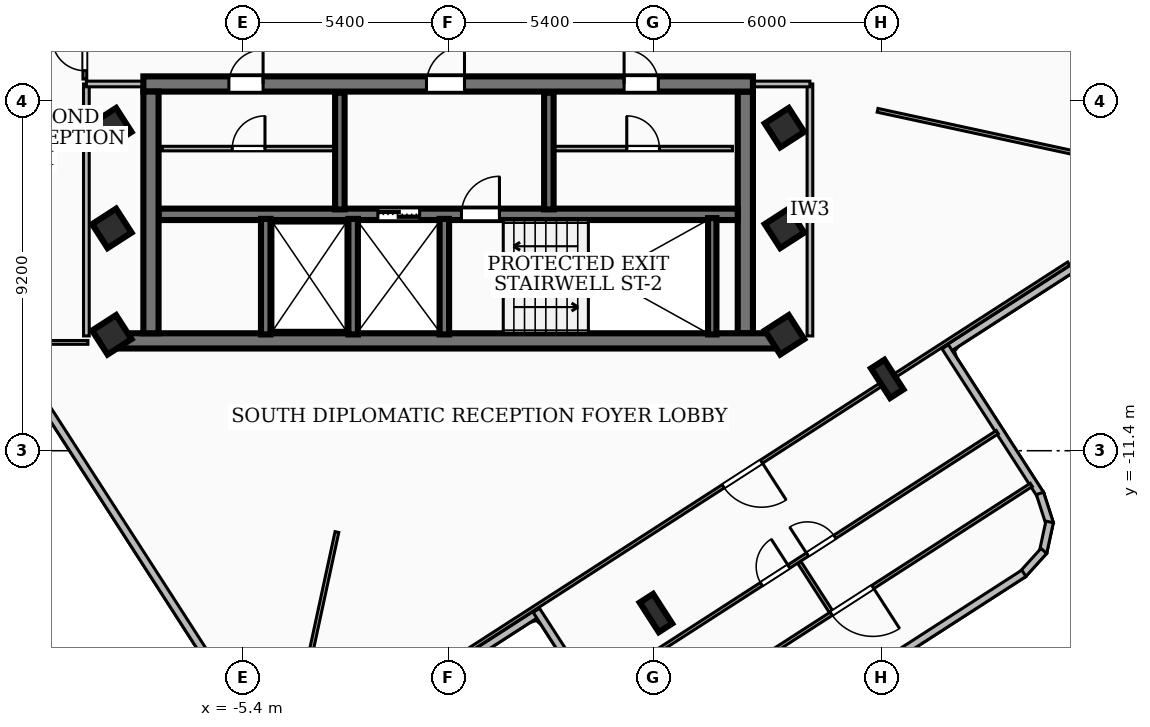
"""IFC4 building model, lengths in metres.
Left out: names, types, materials, properties, quantities, classifications, styles, units other than length and angle.
Written with IfcOpenShell. Run it as: python <this file> out.ifc"""

import sys

from ifc_helpers import new_model, si_unit, direction, frame, frame_2d, origin, origin_2d, place, context, subcontext, project, spatial, rectangle, i_section, extrude, element, fill, save


model = new_model("IFC4")
c1 = context("Model", 3, precision=1e-05, world=origin(), true_north=direction((0.0, 1.0)))
c2 = subcontext(c1, "Body", "Model", "MODEL_VIEW")
j1 = project(units=[si_unit("LENGTHUNIT", "METRE"), si_unit("PLANEANGLEUNIT", "RADIAN")], contexts=[c1])
p1 = place(None, origin())
s1 = spatial("IfcSite", under=j1, at=p1, CompositionType="ELEMENT")
p2 = place(p1, origin())
s2 = spatial("IfcBuilding", under=s1, at=p2, CompositionType="ELEMENT")
p3 = place(p2, frame((0.0, 0.0, 218.88)))
s3 = spatial("IfcBuildingStorey", under=s2, at=p3, CompositionType="ELEMENT", Elevation=218.88)
p4 = place(p3, frame((8.78, -8.51, 0.0), z_axis=(0.0, 0.0, 1.0), x_axis=(-1.0, 0.0, 0.0)))
e1 = element("IfcWall", 1, at=p4, inside=s3, PredefinedType="SHEAR", context=c2, shape_type="SweptSolid", body=[
    extrude(rectangle(XDim=17.56, YDim=0.4, at=frame_2d((8.78, 0.0))), origin(), (0.0, 0.0, 1.0), 3.14),
])
p5 = place(p3, frame((-8.02, -1.75, 0.0), z_axis=(0.0, 0.0, 1.0), x_axis=(1.0, 0.0, 0.0)))
e2 = element("IfcWall", 2, at=p5, inside=s3, PredefinedType="SHEAR", context=c2, shape_type="SweptSolid", body=[
    extrude(rectangle(XDim=16.04, YDim=0.4, at=frame_2d((8.02, 0.0))), origin(), (0.0, 0.0, 1.0), 3.14),
])
p6 = place(p5, frame((7.45, 0.0, 0.0)))
e3 = element("IfcOpeningElement", 3, at=p6, cuts=e2, PredefinedType="OPENING", context=c2, shape_type="SweptSolid", body=[
    extrude(rectangle(XDim=1.0, YDim=2.1, at=frame_2d((0.5, 1.05))), frame((0.0, 0.21, 0.0), z_axis=(0.0, -1.0, 0.0), x_axis=(1.0, 0.0, 0.0)), (0.0, 0.0, 1.0), 0.42),
])
p7 = place(p5, frame((12.65, 0.0, 0.0)))
e4 = element("IfcOpeningElement", 4, at=p7, cuts=e2, PredefinedType="OPENING", context=c2, shape_type="SweptSolid", body=[
    extrude(rectangle(XDim=0.9, YDim=2.06, at=frame_2d((0.45, 1.03))), frame((0.0, 0.21, 0.0), z_axis=(0.0, -1.0, 0.0), x_axis=(1.0, 0.0, 0.0)), (0.0, 0.0, 1.0), 0.42),
])
p8 = place(p5, frame((2.25, 0.0, 0.0)))
e5 = element("IfcOpeningElement", 5, at=p8, cuts=e2, PredefinedType="OPENING", context=c2, shape_type="SweptSolid", body=[
    extrude(rectangle(XDim=0.9, YDim=2.06, at=frame_2d((0.45, 1.03))), frame((0.0, 0.21, 0.0), z_axis=(0.0, -1.0, 0.0), x_axis=(1.0, 0.0, 0.0)), (0.0, 0.0, 1.0), 0.42),
])
for number, where, z_axis, x_axis in (
    (6, (-7.82, -8.31, 0.0), (0.0, 0.0, 1.0), (0.0, 1.0, 0.0)),
    (7, (7.82, -1.95, 0.0), (0.0, 0.0, 1.0), (0.0, -1.0, 0.0)),
):
    element("IfcWall", number, at=place(p3, frame(where, z_axis=z_axis, x_axis=x_axis)), inside=s3, PredefinedType="SHEAR", context=c2, shape_type="SweptSolid", body=[
        extrude(rectangle(XDim=6.36, YDim=0.4, at=frame_2d((3.18, 0.0))), origin(), (0.0, 0.0, 1.0), 3.14),
    ])
p9 = place(p3, frame((-7.62, -5.18, 0.0), z_axis=(0.0, 0.0, 1.0), x_axis=(1.0, 0.0, 0.0)))
e8 = element("IfcWall", 8, at=p9, inside=s3, PredefinedType="SOLIDWALL", context=c2, shape_type="SweptSolid", body=[
    extrude(rectangle(XDim=15.24, YDim=0.3, at=frame_2d((7.62, 0.0))), origin(), (0.0, 0.0, 1.0), 3.14),
])
p10 = place(p9, frame((5.77, 0.0, 0.0)))
e9 = element("IfcOpeningElement", 9, at=p10, cuts=e8, PredefinedType="OPENING", context=c2, shape_type="SweptSolid", body=[
    extrude(rectangle(XDim=1.1, YDim=2.15, at=frame_2d((0.55, 1.075))), frame((0.0, 0.16, 0.0), z_axis=(0.0, -1.0, 0.0), x_axis=(1.0, 0.0, 0.0)), (0.0, 0.0, 1.0), 0.32),
])
p11 = place(p9, frame((7.97, 0.0, 0.0)))
e10 = element("IfcOpeningElement", 10, at=p11, cuts=e8, PredefinedType="OPENING", context=c2, shape_type="SweptSolid", body=[
    extrude(rectangle(XDim=1.0, YDim=2.1, at=frame_2d((0.5, 1.05))), frame((0.0, 0.16, 0.0), z_axis=(0.0, -1.0, 0.0), x_axis=(1.0, 0.0, 0.0)), (0.0, 0.0, 1.0), 0.32),
])
p12 = place(p3, frame((6.95, -8.34, 0.0), z_axis=(0.0, 0.0, 1.0), x_axis=(0.0, 1.0, 0.0)))
e11 = element("IfcWall", 11, at=p12, inside=s3, PredefinedType="SOLIDWALL", context=c2, shape_type="SweptSolid", body=[
    extrude(rectangle(XDim=3.06, YDim=0.22, at=frame_2d((1.53, 0.0))), origin(), (0.0, 0.0, 1.0), 3.14),
])
for number, where, z_axis, x_axis in (
    (12, (-0.1, -8.34, 0.0), (0.0, 0.0, 1.0), (0.0, 1.0, 0.0)),
    (13, (-2.5, -8.34, 0.0), (0.0, 0.0, 1.0), (0.0, 1.0, 0.0)),
    (14, (-4.8, -8.34, 0.0), (0.0, 0.0, 1.0), (0.0, 1.0, 0.0)),
):
    element("IfcWall", number, at=place(p3, frame(where, z_axis=z_axis, x_axis=x_axis)), inside=s3, PredefinedType="SOLIDWALL", context=c2, shape_type="SweptSolid", body=[
        extrude(rectangle(XDim=3.04, YDim=0.25, at=frame_2d((1.52, 0.0))), origin(), (0.0, 0.0, 1.0), 3.14),
    ])
for number, where, z_axis, x_axis in (
    (15, (-2.85, -5.05, 0.0), (0.0, 0.0, 1.0), (0.0, 1.0, 0.0)),
    (16, (2.65, -5.05, 0.0), (0.0, 0.0, 1.0), (0.0, 1.0, 0.0)),
):
    element("IfcWall", number, at=place(p3, frame(where, z_axis=z_axis, x_axis=x_axis)), inside=s3, PredefinedType="SOLIDWALL", context=c2, shape_type="SweptSolid", body=[
        extrude(rectangle(XDim=3.07, YDim=0.25, at=frame_2d((1.535, 0.0))), origin(), (0.0, 0.0, 1.0), 3.14),
    ])
for number, where, z_axis, x_axis in (
    (17, (-8.85, -5.55, 0.0), (0.0, 0.0, 1.0), (0.841, 0.542, 0.0)),
    (18, (-8.85, -2.9, 0.0), (0.0, 0.0, 1.0), (0.841, 0.542, 0.0)),
    (19, (8.85, -5.55, 0.0), (0.0, 0.0, 1.0), (0.841, 0.542, 0.0)),
    (20, (8.85, -2.9, 0.0), (0.0, 0.0, 1.0), (0.841, 0.542, 0.0)),
    (21, (8.85, -8.35, 0.0), (0.0, 0.0, 1.0), (0.841, 0.542, 0.0)),
    (22, (-8.85, -8.35, 0.0), (0.0, 0.0, 1.0), (0.841, 0.542, 0.0)),
):
    element("IfcColumn", number, at=place(p3, frame(where, z_axis=z_axis, x_axis=x_axis)), inside=s3, PredefinedType="COLUMN", context=c2, shape_type="SweptSolid", body=[
        extrude(rectangle(XDim=0.75, YDim=0.75, at=origin_2d()), origin(), (0.0, 0.0, 1.0), 3.42),
    ])
for number, where, z_axis, x_axis in (
    (23, (5.468, -15.671, 0.0), (0.0, 0.0, 1.0), (0.841, 0.542, 0.0)),
    (24, (11.554, -9.51, 0.0), (0.0, 0.0, 1.0), (0.841, 0.542, 0.0)),
):
    element("IfcColumn", number, at=place(p3, frame(where, z_axis=z_axis, x_axis=x_axis)), inside=s3, PredefinedType="COLUMN", context=c2, shape_type="SweptSolid", body=[
        extrude(i_section(OverallWidth=0.418, OverallDepth=0.927, WebThickness=0.019, FlangeThickness=0.032, at=origin_2d()), origin(), (0.0, 0.0, 1.0), 3.42),
    ])
p13 = place(p3, frame((2.431, -15.624, 0.0), z_axis=(0.0, 0.0, 1.0), x_axis=(-0.840561972283, -0.541715396451, 0.0)))
e25 = element("IfcWall", 25, at=p13, inside=s3, PredefinedType="SOLIDWALL", context=c2, shape_type="SweptSolid", body=[
    extrude(rectangle(XDim=6.542, YDim=0.2, at=frame_2d((3.271, 0.0))), origin(), (0.0, 0.0, 1.0), 3.14),
])
p14 = place(p3, frame((-5.124, -18.723, 0.0), z_axis=(0.0, 0.0, 1.0), x_axis=(-0.541724400477, 0.840556169407, 0.0)))
e26 = element("IfcWall", 26, at=p14, inside=s3, PredefinedType="SOLIDWALL", context=c2, shape_type="SweptSolid", body=[
    extrude(rectangle(XDim=25.925, YDim=0.2, at=frame_2d((12.962, 0.0))), origin(), (0.0, 0.0, 1.0), 3.14),
])
p15 = place(p14, frame((19.321, 0.0, 0.85)))
e27 = element("IfcOpeningElement", 27, at=p15, cuts=e26, PredefinedType="OPENING", context=c2, shape_type="SweptSolid", body=[
    extrude(rectangle(XDim=1.8, YDim=1.8, at=frame_2d((0.9, 0.9))), frame((0.0, 0.11, 0.0), z_axis=(0.0, -1.0, 0.0), x_axis=(1.0, 0.0, 0.0)), (0.0, 0.0, 1.0), 0.22),
])
p16 = place(p3, frame((15.624, 2.431, 0.0), z_axis=(0.0, 0.0, 1.0), x_axis=(0.541715396451, -0.840561972283, 0.0)))
e28 = element("IfcWall", 28, at=p16, inside=s3, PredefinedType="SOLIDWALL", context=c2, shape_type="SweptSolid", body=[
    extrude(rectangle(XDim=6.542, YDim=0.2, at=frame_2d((3.271, 0.0))), origin(), (0.0, 0.0, 1.0), 3.14),
])
p17 = place(p3, frame((18.723, -5.124, 0.0), z_axis=(0.0, 0.0, 1.0), x_axis=(-0.840584959151, -0.541679726821, 0.0)))
e29 = element("IfcWall", 29, at=p17, inside=s3, PredefinedType="SOLIDWALL", context=c2, shape_type="SweptSolid", body=[
    extrude(rectangle(XDim=6.742, YDim=0.2, at=frame_2d((3.371, 0.0))), origin(), (0.0, 0.0, 1.0), 3.14),
])
p18 = place(p3, frame((13.08, -8.666, 0.0), z_axis=(0.0, 0.0, 1.0), x_axis=(0.541732711374, -0.840550813114, 0.0)))
e30 = element("IfcWall", 30, at=p18, inside=s3, PredefinedType="SOLIDWALL", context=c2, shape_type="SweptSolid", body=[
    extrude(rectangle(XDim=4.642, YDim=0.2, at=frame_2d((2.321, 0.0))), origin(), (0.0, 0.0, 1.0), 3.14),
])
p19 = place(p3, frame((15.573, -12.523, 0.0), z_axis=(0.0, 0.0, 1.0), x_axis=(0.306602907463, -0.951837516142, 0.0)))
e31 = element("IfcWall", 31, at=p19, inside=s3, PredefinedType="SOLIDWALL", context=c2, shape_type="SweptSolid", body=[
    extrude(rectangle(XDim=0.838, YDim=0.2, at=frame_2d((0.419, 0.0))), origin(), (0.0, 0.0, 1.0), 3.14),
])
p20 = place(p3, frame((15.827, -13.273, 0.0), z_axis=(0.0, 0.0, 1.0), x_axis=(-0.210782404691, -0.977533006027, 0.0)))
e32 = element("IfcWall", 32, at=p20, inside=s3, PredefinedType="SOLIDWALL", context=c2, shape_type="SweptSolid", body=[
    extrude(rectangle(XDim=0.825, YDim=0.2, at=frame_2d((0.412, 0.0))), origin(), (0.0, 0.0, 1.0), 3.14),
])
p21 = place(p3, frame((15.675, -14.036, 0.0), z_axis=(0.0, 0.0, 1.0), x_axis=(-0.671019988703, -0.741439258983, 0.0)))
e33 = element("IfcWall", 33, at=p21, inside=s3, PredefinedType="SOLIDWALL", context=c2, shape_type="SweptSolid", body=[
    extrude(rectangle(XDim=0.839, YDim=0.2, at=frame_2d((0.419, 0.0))), origin(), (0.0, 0.0, 1.0), 3.14),
])
p22 = place(p3, frame((15.15, -14.625, 0.0), z_axis=(0.0, 0.0, 1.0), x_axis=(-0.84055619882, -0.541724354839, 0.0)))
e34 = element("IfcWall", 34, at=p22, inside=s3, PredefinedType="SOLIDWALL", context=c2, shape_type="SweptSolid", body=[
    extrude(rectangle(XDim=9.824, YDim=0.2, at=frame_2d((4.912, 0.0))), origin(), (0.0, 0.0, 1.0), 3.14),
])
p23 = place(p22, frame((6.913, 0.0, 0.85)))
e35 = element("IfcOpeningElement", 35, at=p23, cuts=e34, PredefinedType="OPENING", context=c2, shape_type="SweptSolid", body=[
    extrude(rectangle(XDim=1.5, YDim=1.8, at=frame_2d((0.75, 0.9))), frame((0.0, 0.11, 0.0), z_axis=(0.0, -1.0, 0.0), x_axis=(1.0, 0.0, 0.0)), (0.0, 0.0, 1.0), 0.22),
])
p24 = place(p3, frame((4.836, -19.502, 0.0), z_axis=(0.0, 0.0, 1.0), x_axis=(-0.541756659411, 0.840535378187, 0.0)))
e36 = element("IfcWall", 36, at=p24, inside=s3, PredefinedType="SOLIDWALL", context=c2, shape_type="SweptSolid", body=[
    extrude(rectangle(XDim=4.642, YDim=0.2, at=frame_2d((2.321, 0.0))), origin(), (0.0, 0.0, 1.0), 3.14),
])
p25 = place(p3, frame((2.8, -3.45, 0.0), z_axis=(0.0, 0.0, 1.0), x_axis=(1.0, 0.0, 0.0)))
e37 = element("IfcWall", 37, at=p25, inside=s3, PredefinedType="PARTITIONING", context=c2, shape_type="SweptSolid", body=[
    extrude(rectangle(XDim=4.68, YDim=0.12, at=frame_2d((2.34, 0.0))), origin(), (0.0, 0.0, 1.0), 3.14),
])
p26 = place(p25, frame((1.9, 0.0, 0.0)))
e38 = element("IfcOpeningElement", 38, at=p26, cuts=e37, PredefinedType="OPENING", context=c2, shape_type="SweptSolid", body=[
    extrude(rectangle(XDim=0.86, YDim=2.04, at=frame_2d((0.43, 1.02))), frame((0.0, 0.07, 0.0), z_axis=(0.0, -1.0, 0.0), x_axis=(1.0, 0.0, 0.0)), (0.0, 0.0, 1.0), 0.14),
])
p27 = place(p3, frame((-7.52, -3.45, 0.0), z_axis=(0.0, 0.0, 1.0), x_axis=(1.0, 0.0, 0.0)))
e39 = element("IfcWall", 39, at=p27, inside=s3, PredefinedType="PARTITIONING", context=c2, shape_type="SweptSolid", body=[
    extrude(rectangle(XDim=4.54, YDim=0.12, at=frame_2d((2.27, 0.0))), origin(), (0.0, 0.0, 1.0), 3.14),
])
p28 = place(p27, frame((1.84, 0.0, 0.0)))
e40 = element("IfcOpeningElement", 40, at=p28, cuts=e39, PredefinedType="OPENING", context=c2, shape_type="SweptSolid", body=[
    extrude(rectangle(XDim=0.86, YDim=2.04, at=frame_2d((0.43, 1.02))), frame((0.0, 0.07, 0.0), z_axis=(0.0, -1.0, 0.0), x_axis=(1.0, 0.0, 0.0)), (0.0, 0.0, 1.0), 0.14),
])
p29 = place(p3, frame((-9.52, -8.38, 0.0), z_axis=(0.0, 0.0, 1.0), x_axis=(0.0, 1.0, 0.0)))
e41 = element("IfcWall", 41, at=p29, inside=s3, PredefinedType="PARTITIONING", context=c2, shape_type="SweptSolid", body=[
    extrude(rectangle(XDim=6.63, YDim=0.15, at=frame_2d((3.315, 0.0))), origin(), (0.0, 0.0, 1.0), 3.14),
])
p30 = place(p3, frame((-7.85, -1.75, 0.0), z_axis=(0.0, 0.0, 1.0), x_axis=(-1.0, 0.0, 0.0)))
e42 = element("IfcWall", 42, at=p30, inside=s3, PredefinedType="PARTITIONING", context=c2, shape_type="SweptSolid", body=[
    extrude(rectangle(XDim=1.67, YDim=0.15, at=frame_2d((0.835, 0.0))), origin(), (0.0, 0.0, 1.0), 2.37),
])
p31 = place(p3, frame((9.52, -8.38, 0.0), z_axis=(0.0, 0.0, 1.0), x_axis=(0.0, 1.0, 0.0)))
e43 = element("IfcWall", 43, at=p31, inside=s3, PredefinedType="PARTITIONING", context=c2, shape_type="SweptSolid", body=[
    extrude(rectangle(XDim=6.63, YDim=0.15, at=frame_2d((3.315, 0.0))), origin(), (0.0, 0.0, 1.0), 3.14),
])
p32 = place(p3, frame((7.85, -1.75, 0.0), z_axis=(0.0, 0.0, 1.0), x_axis=(1.0, 0.0, 0.0)))
e44 = element("IfcWall", 44, at=p32, inside=s3, PredefinedType="PARTITIONING", context=c2, shape_type="SweptSolid", body=[
    extrude(rectangle(XDim=1.67, YDim=0.15, at=frame_2d((0.835, 0.0))), origin(), (0.0, 0.0, 1.0), 2.37),
])
p33 = place(p3, frame((-11.603, -8.55, 0.0), z_axis=(0.0, 0.0, 1.0), x_axis=(1.0, 0.0, 0.0)))
e45 = element("IfcWall", 45, at=p33, inside=s3, PredefinedType="PARTITIONING", context=c2, shape_type="SweptSolid", body=[
    extrude(rectangle(XDim=2.123, YDim=0.1, at=frame_2d((1.062, 0.0))), origin(), (0.0, 0.0, 1.0), 3.14),
])
p34 = place(p3, frame((-9.56, -1.62, 0.0), z_axis=(0.0, 0.0, 1.0), x_axis=(0.0, 1.0, 0.0)))
e46 = element("IfcWall", 46, at=p34, inside=s3, PredefinedType="PARTITIONING", context=c2, shape_type="SweptSolid", body=[
    extrude(rectangle(XDim=3.24, YDim=0.1, at=frame_2d((1.62, 0.0))), origin(), (0.0, 0.0, 1.0), 3.14),
])
p35 = place(p34, frame((0.22, 0.0, 0.0)))
e47 = element("IfcOpeningElement", 47, at=p35, cuts=e46, PredefinedType="OPENING", context=c2, shape_type="SweptSolid", body=[
    extrude(rectangle(XDim=0.86, YDim=2.04, at=frame_2d((0.43, 1.02))), frame((0.0, 0.06, 0.0), z_axis=(0.0, -1.0, 0.0), x_axis=(1.0, 0.0, 0.0)), (0.0, 0.0, 1.0), 0.12),
])
p36 = place(p34, frame((2.16, 0.0, 0.0)))
e48 = element("IfcOpeningElement", 48, at=p36, cuts=e46, PredefinedType="OPENING", context=c2, shape_type="SweptSolid", body=[
    extrude(rectangle(XDim=0.86, YDim=2.04, at=frame_2d((0.43, 1.02))), frame((0.0, 0.06, 0.0), z_axis=(0.0, -1.0, 0.0), x_axis=(1.0, 0.0, 0.0)), (0.0, 0.0, 1.0), 0.12),
])
p37 = place(p3, frame((-2.927, -13.54, 0.0), z_axis=(0.0, 0.0, 1.0), x_axis=(-0.21141803497, -0.977395730751, 0.0)))
e49 = element("IfcWall", 49, at=p37, inside=s3, PredefinedType="PARTITIONING", context=c2, shape_type="SweptSolid", body=[
    extrude(rectangle(XDim=5.842, YDim=0.1, at=frame_2d((2.921, 0.0))), origin(), (0.0, 0.0, 1.0), 3.14),
])
p38 = place(p3, frame((11.3, -2.443, 0.0), z_axis=(0.0, 0.0, 1.0), x_axis=(0.977411986974, -0.211342867681, 0.0)))
e50 = element("IfcWall", 50, at=p38, inside=s3, PredefinedType="PARTITIONING", context=c2, shape_type="SweptSolid", body=[
    extrude(rectangle(XDim=8.134, YDim=0.1, at=frame_2d((4.067, 0.0))), origin(), (0.0, 0.0, 1.0), 3.14),
])
p39 = place(p3, frame((16.331, -6.476, 0.0), z_axis=(0.0, 0.0, 1.0), x_axis=(-0.840579457381, -0.541688264437, 0.0)))
e51 = element("IfcWall", 51, at=p39, inside=s3, PredefinedType="PARTITIONING", context=c2, shape_type="SweptSolid", body=[
    extrude(rectangle(XDim=20.238, YDim=0.1, at=frame_2d((10.119, 0.0))), origin(), (0.0, 0.0, 1.0), 2.51),
])
p40 = place(p39, frame((9.619, 0.0, 0.0)))
e52 = element("IfcOpeningElement", 52, at=p40, cuts=e51, PredefinedType="OPENING", context=c2, shape_type="SweptSolid", body=[
    extrude(rectangle(XDim=1.2, YDim=2.1, at=frame_2d((0.6, 1.05))), frame((0.0, 0.06, 0.0), z_axis=(0.0, -1.0, 0.0), x_axis=(1.0, 0.0, 0.0)), (0.0, 0.0, 1.0), 0.12),
])
p41 = place(p3, frame((9.242, -14.34, 0.0), z_axis=(0.0, 0.0, 1.0), x_axis=(0.541443159102, -0.840737358193, 0.0)))
e53 = element("IfcWall", 53, at=p41, inside=s3, PredefinedType="PARTITIONING", context=c2, shape_type="SweptSolid", body=[
    extrude(rectangle(XDim=1.53, YDim=0.1, at=frame_2d((0.765, 0.0))), origin(), (0.0, 0.0, 1.0), 3.14),
])
p42 = place(p3, frame((3.8, -17.775, 0.0), z_axis=(0.0, 0.0, 1.0), x_axis=(0.840588193286, 0.54167470802, 0.0)))
e54 = element("IfcWall", 54, at=p42, inside=s3, PredefinedType="PARTITIONING", context=c2, shape_type="SweptSolid", body=[
    extrude(rectangle(XDim=12.67, YDim=0.1, at=frame_2d((6.335, 0.0))), origin(), (0.0, 0.0, 1.0), 3.14),
])
p43 = place(p42, frame((5.285, 0.0, 0.0)))
e55 = element("IfcOpeningElement", 55, at=p43, cuts=e54, PredefinedType="OPENING", context=c2, shape_type="SweptSolid", body=[
    extrude(rectangle(XDim=0.86, YDim=2.04, at=frame_2d((0.43, 1.02))), frame((0.0, 0.06, 0.0), z_axis=(0.0, -1.0, 0.0), x_axis=(1.0, 0.0, 0.0)), (0.0, 0.0, 1.0), 0.12),
])
p44 = place(p42, frame((6.725, 0.0, 0.0)))
e56 = element("IfcOpeningElement", 56, at=p44, cuts=e54, PredefinedType="OPENING", context=c2, shape_type="SweptSolid", body=[
    extrude(rectangle(XDim=0.86, YDim=2.04, at=frame_2d((0.43, 1.02))), frame((0.0, 0.06, 0.0), z_axis=(0.0, -1.0, 0.0), x_axis=(1.0, 0.0, 0.0)), (0.0, 0.0, 1.0), 0.12),
])
p45 = place(p3, frame((15.344, -12.299, 0.0), z_axis=(0.0, 0.0, 1.0), x_axis=(-0.840579419228, -0.541688323642, 0.0)))
e57 = element("IfcWall", 57, at=p45, inside=s3, PredefinedType="PARTITIONING", context=c2, shape_type="SweptSolid", body=[
    extrude(rectangle(XDim=12.67, YDim=0.1, at=frame_2d((6.335, 0.0))), origin(), (0.0, 0.0, 1.0), 3.14),
])
p46 = place(p45, frame((4.96, 0.0, 0.0)))
e58 = element("IfcOpeningElement", 58, at=p46, cuts=e57, PredefinedType="OPENING", context=c2, shape_type="SweptSolid", body=[
    extrude(rectangle(XDim=1.3, YDim=2.1, at=frame_2d((0.65, 1.05))), frame((0.0, 0.06, 0.0), z_axis=(0.0, -1.0, 0.0), x_axis=(1.0, 0.0, 0.0)), (0.0, 0.0, 1.0), 0.12),
])
p47 = place(p6, origin())
e59 = element("IfcDoor", 59, at=p47, inside=s3, OperationType="SINGLE_SWING_RIGHT", PredefinedType="DOOR", context=c2, shape_type="SweptSolid", body=[
    extrude(rectangle(XDim=1.0, YDim=2.1, at=frame_2d((0.5, 1.05))), frame((0.0, 0.025, 0.0), z_axis=(0.0, -1.0, 0.0), x_axis=(1.0, 0.0, 0.0)), (0.0, 0.0, 1.0), 0.05),
])
fill(e3, e59)
p48 = place(p10, origin())
e60 = element("IfcDoor", 60, at=p48, inside=s3, OperationType="DOUBLE_DOOR_SLIDING", PredefinedType="DOOR", context=c2, shape_type="SweptSolid", body=[
    extrude(rectangle(XDim=1.1, YDim=2.15, at=frame_2d((0.55, 1.075))), frame((0.0, 0.025, 0.0), z_axis=(0.0, -1.0, 0.0), x_axis=(1.0, 0.0, 0.0)), (0.0, 0.0, 1.0), 0.05),
])
fill(e9, e60)
p49 = place(p11, origin())
e61 = element("IfcDoor", 61, at=p49, inside=s3, OperationType="SINGLE_SWING_RIGHT", PredefinedType="DOOR", context=c2, shape_type="SweptSolid", body=[
    extrude(rectangle(XDim=1.0, YDim=2.1, at=frame_2d((0.5, 1.05))), frame((0.0, 0.025, 0.0), z_axis=(0.0, -1.0, 0.0), x_axis=(1.0, 0.0, 0.0)), (0.0, 0.0, 1.0), 0.05),
])
fill(e10, e61)
p50 = place(p7, origin())
e62 = element("IfcDoor", 62, at=p50, inside=s3, OperationType="SINGLE_SWING_LEFT", PredefinedType="DOOR", context=c2, shape_type="SweptSolid", body=[
    extrude(rectangle(XDim=0.9, YDim=2.06, at=frame_2d((0.45, 1.03))), frame((0.0, 0.025, 0.0), z_axis=(0.0, -1.0, 0.0), x_axis=(1.0, 0.0, 0.0)), (0.0, 0.0, 1.0), 0.05),
])
fill(e4, e62)
p51 = place(p8, origin())
e63 = element("IfcDoor", 63, at=p51, inside=s3, OperationType="SINGLE_SWING_RIGHT", PredefinedType="DOOR", context=c2, shape_type="SweptSolid", body=[
    extrude(rectangle(XDim=0.9, YDim=2.06, at=frame_2d((0.45, 1.03))), frame((0.0, 0.025, 0.0), z_axis=(0.0, -1.0, 0.0), x_axis=(1.0, 0.0, 0.0)), (0.0, 0.0, 1.0), 0.05),
])
fill(e5, e63)
p52 = place(p26, origin())
e64 = element("IfcDoor", 64, at=p52, inside=s3, OperationType="SINGLE_SWING_LEFT", PredefinedType="DOOR", context=c2, shape_type="SweptSolid", body=[
    extrude(rectangle(XDim=0.86, YDim=2.04, at=frame_2d((0.43, 1.02))), frame((0.0, 0.025, 0.0), z_axis=(0.0, -1.0, 0.0), x_axis=(1.0, 0.0, 0.0)), (0.0, 0.0, 1.0), 0.05),
])
fill(e38, e64)
p53 = place(p28, origin())
e65 = element("IfcDoor", 65, at=p53, inside=s3, OperationType="SINGLE_SWING_RIGHT", PredefinedType="DOOR", context=c2, shape_type="SweptSolid", body=[
    extrude(rectangle(XDim=0.86, YDim=2.04, at=frame_2d((0.43, 1.02))), frame((0.0, 0.025, 0.0), z_axis=(0.0, -1.0, 0.0), x_axis=(1.0, 0.0, 0.0)), (0.0, 0.0, 1.0), 0.05),
])
fill(e40, e65)
p54 = place(p35, origin())
e66 = element("IfcDoor", 66, at=p54, inside=s3, OperationType="SINGLE_SWING_RIGHT", PredefinedType="DOOR", context=c2, shape_type="SweptSolid", body=[
    extrude(rectangle(XDim=0.86, YDim=2.04, at=frame_2d((0.43, 1.02))), frame((0.0, 0.025, 0.0), z_axis=(0.0, -1.0, 0.0), x_axis=(1.0, 0.0, 0.0)), (0.0, 0.0, 1.0), 0.05),
])
fill(e47, e66)
p55 = place(p40, origin())
e67 = element("IfcDoor", 67, at=p55, inside=s3, OperationType="SINGLE_SWING_LEFT", PredefinedType="DOOR", context=c2, shape_type="SweptSolid", body=[
    extrude(rectangle(XDim=1.2, YDim=2.1, at=frame_2d((0.6, 1.05))), frame((0.0, 0.025, 0.0), z_axis=(0.0, -1.0, 0.0), x_axis=(1.0, 0.0, 0.0)), (0.0, 0.0, 1.0), 0.05),
])
fill(e52, e67)
p56 = place(p43, origin())
e68 = element("IfcDoor", 68, at=p56, inside=s3, OperationType="SINGLE_SWING_RIGHT", PredefinedType="DOOR", context=c2, shape_type="SweptSolid", body=[
    extrude(rectangle(XDim=0.86, YDim=2.04, at=frame_2d((0.43, 1.02))), frame((0.0, 0.025, 0.0), z_axis=(0.0, -1.0, 0.0), x_axis=(1.0, 0.0, 0.0)), (0.0, 0.0, 1.0), 0.05),
])
fill(e55, e68)
p57 = place(p44, origin())
e69 = element("IfcDoor", 69, at=p57, inside=s3, OperationType="SINGLE_SWING_LEFT", PredefinedType="DOOR", context=c2, shape_type="SweptSolid", body=[
    extrude(rectangle(XDim=0.86, YDim=2.04, at=frame_2d((0.43, 1.02))), frame((0.0, 0.025, 0.0), z_axis=(0.0, -1.0, 0.0), x_axis=(1.0, 0.0, 0.0)), (0.0, 0.0, 1.0), 0.05),
])
fill(e56, e69)
p58 = place(p46, origin())
e70 = element("IfcDoor", 70, at=p58, inside=s3, OperationType="SINGLE_SWING_LEFT", PredefinedType="DOOR", context=c2, shape_type="SweptSolid", body=[
    extrude(rectangle(XDim=1.3, YDim=2.1, at=frame_2d((0.65, 1.05))), frame((0.0, 0.025, 0.0), z_axis=(0.0, -1.0, 0.0), x_axis=(1.0, 0.0, 0.0)), (0.0, 0.0, 1.0), 0.05),
])
fill(e58, e70)
save(model, sys.argv[1])
